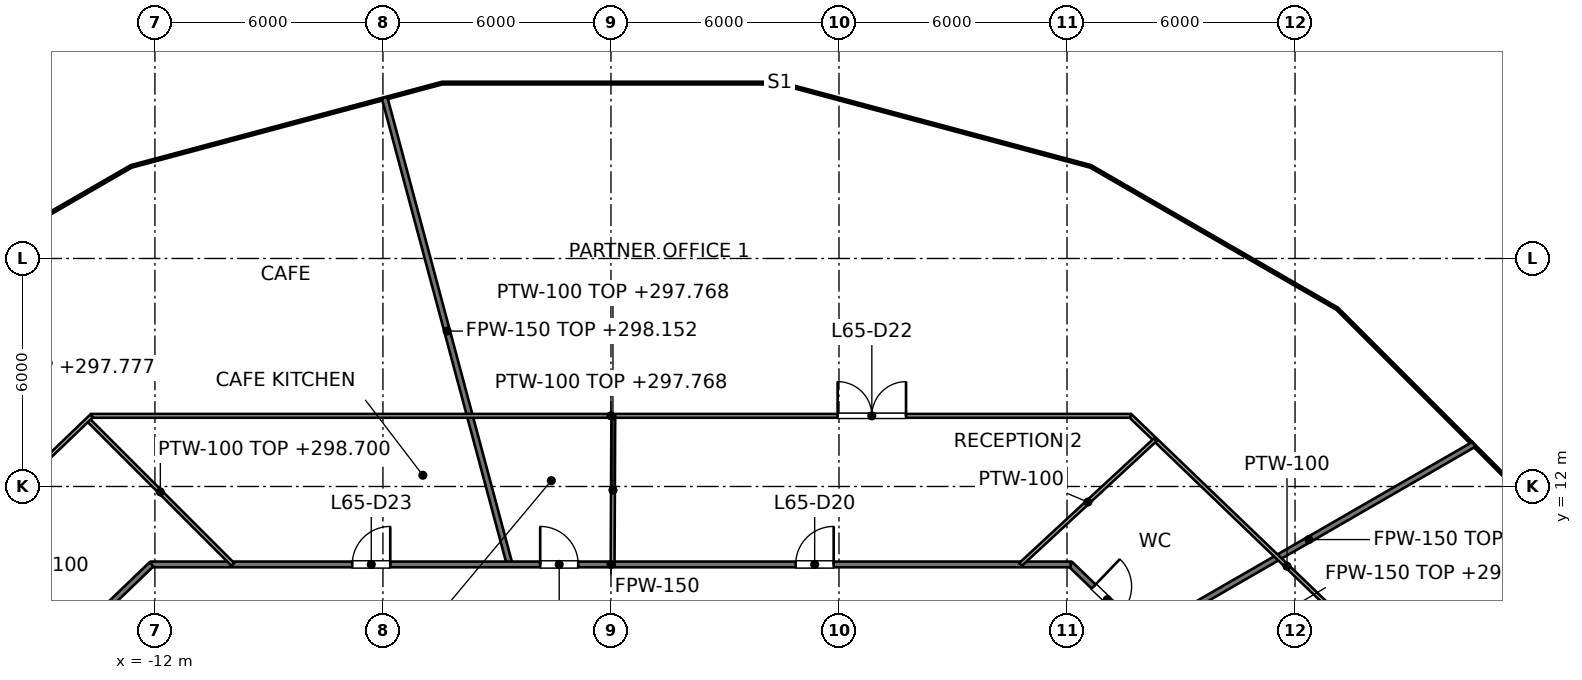
"""IFC4 building model, lengths in metres.
Left out: names, types, materials, properties, quantities, classifications, styles, units other than length and angle.
Written with IfcOpenShell. Run it as: python <this file> out.ifc"""

import sys

from ifc_helpers import new_model, si_unit, direction, frame, frame_2d, origin, place, context, subcontext, project, spatial, rectangle, extrude, element, fill, save


model = new_model("IFC4")
c1 = context("Model", 3, precision=1e-05, world=origin(), true_north=direction((0.0, 1.0)))
c2 = subcontext(c1, "Body", "Model", "MODEL_VIEW")
j1 = project(units=[si_unit("LENGTHUNIT", "METRE"), si_unit("PLANEANGLEUNIT", "RADIAN")], contexts=[c1])
p1 = place(None, origin())
s1 = spatial("IfcSite", under=j1, at=p1, CompositionType="ELEMENT")
p2 = place(p1, origin())
s2 = spatial("IfcBuilding", under=s1, at=p2, CompositionType="ELEMENT")
p3 = place(p2, frame((0.0, 0.0, 295.0)))
s3 = spatial("IfcBuildingStorey", under=s2, at=p3, CompositionType="ELEMENT", Elevation=295.0)
p4 = place(p3, frame((-5.957, 22.23, 0.0), z_axis=(0.0, 0.0, 1.0), x_axis=(0.258861178381, -0.965914535726, 0.0)))
e1 = element("IfcWall", 1, at=p4, inside=s3, PredefinedType="PARTITIONING", context=c2, shape_type="SweptSolid", body=[
    extrude(rectangle(XDim=12.714, YDim=0.15, at=frame_2d((6.357, 0.0))), origin(), (0.0, 0.0, 1.0), 3.152),
])
p5 = place(p3, frame((12.095, 9.949, 0.0), z_axis=(0.0, 0.0, 1.0), x_axis=(0.721290181137, -0.692633001376, 0.0)))
e2 = element("IfcWall", 2, at=p5, inside=s3, PredefinedType="PARTITIONING", context=c2, shape_type="SweptSolid", body=[
    extrude(rectangle(XDim=8.187, YDim=0.15, at=frame_2d((4.094, 0.0))), origin(), (0.0, 0.0, 1.0), 2.777),
])
p6 = place(p5, frame((0.839, 0.0, 0.0)))
e3 = element("IfcOpeningElement", 3, at=p6, cuts=e2, PredefinedType="OPENING", context=c2, shape_type="SweptSolid", body=[
    extrude(rectangle(XDim=1.0, YDim=2.1, at=frame_2d((0.5, 1.05))), frame((0.0, 0.075, 0.0), z_axis=(0.0, -1.0, 0.0), x_axis=(1.0, 0.0, 0.0)), (0.0, 0.0, 1.0), 0.15),
])
p7 = place(p3, frame((-12.095, 9.949, 0.0), z_axis=(0.0, 0.0, 1.0), x_axis=(1.0, 0.0, 0.0)))
e4 = element("IfcWall", 4, at=p7, inside=s3, PredefinedType="PARTITIONING", context=c2, shape_type="SweptSolid", body=[
    extrude(rectangle(XDim=24.19, YDim=0.15, at=frame_2d((12.095, 0.0))), origin(), (0.0, 0.0, 1.0), 2.768),
])
p8 = place(p7, frame((16.955, 0.0, 0.0)))
e5 = element("IfcOpeningElement", 5, at=p8, cuts=e4, PredefinedType="OPENING", context=c2, shape_type="SweptSolid", body=[
    extrude(rectangle(XDim=1.0, YDim=2.1, at=frame_2d((0.5, 1.05))), frame((0.0, 0.075, 0.0), z_axis=(0.0, -1.0, 0.0), x_axis=(1.0, 0.0, 0.0)), (0.0, 0.0, 1.0), 0.15),
])
p9 = place(p7, frame((10.233, 0.0, 0.0)))
e6 = element("IfcOpeningElement", 6, at=p9, cuts=e4, PredefinedType="OPENING", context=c2, shape_type="SweptSolid", body=[
    extrude(rectangle(XDim=1.0, YDim=2.1, at=frame_2d((0.5, 1.05))), frame((0.0, 0.075, 0.0), z_axis=(0.0, -1.0, 0.0), x_axis=(1.0, 0.0, 0.0)), (0.0, 0.0, 1.0), 0.15),
])
p10 = place(p7, frame((5.288, 0.0, 0.0)))
e7 = element("IfcOpeningElement", 7, at=p10, cuts=e4, PredefinedType="OPENING", context=c2, shape_type="SweptSolid", body=[
    extrude(rectangle(XDim=1.0, YDim=2.1, at=frame_2d((0.5, 1.05))), frame((0.0, 0.075, 0.0), z_axis=(0.0, -1.0, 0.0), x_axis=(1.0, 0.0, 0.0)), (0.0, 0.0, 1.0), 0.15),
])
p11 = place(p3, frame((14.024, 8.097, 0.0), z_axis=(0.0, 0.0, 1.0), x_axis=(0.866012014455, 0.500023190282, 0.0)))
e8 = element("IfcWall", 8, at=p11, inside=s3, PredefinedType="PARTITIONING", context=c2, shape_type="SweptSolid", body=[
    extrude(rectangle(XDim=10.025, YDim=0.15, at=frame_2d((5.013, 0.0))), origin(), (0.0, 0.0, 1.0), 3.274),
])
p12 = place(p3, frame((-18.0, 4.278, 0.0), z_axis=(0.0, 0.0, 1.0), x_axis=(0.721363483883, 0.692556657697, 0.0)))
e9 = element("IfcWall", 9, at=p12, inside=s3, PredefinedType="PARTITIONING", context=c2, shape_type="SweptSolid", body=[
    extrude(rectangle(XDim=8.187, YDim=0.15, at=frame_2d((4.094, 0.0))), origin(), (0.0, 0.0, 1.0), 2.777),
])
p13 = place(p12, frame((3.646, 0.0, 0.0)))
e10 = element("IfcOpeningElement", 10, at=p13, cuts=e9, PredefinedType="OPENING", context=c2, shape_type="SweptSolid", body=[
    extrude(rectangle(XDim=1.0, YDim=2.1, at=frame_2d((0.5, 1.05))), frame((0.0, 0.075, 0.0), z_axis=(0.0, -1.0, 0.0), x_axis=(1.0, 0.0, 0.0)), (0.0, 0.0, 1.0), 0.15),
])
p14 = place(p3, frame((-13.766, 13.765, 0.0), z_axis=(0.0, 0.0, 1.0), x_axis=(0.707219854948, -0.70699368934, 0.0)))
e11 = element("IfcWall", 11, at=p14, inside=s3, PredefinedType="PARTITIONING", context=c2, shape_type="SweptSolid", body=[
    extrude(rectangle(XDim=5.397, YDim=0.1, at=frame_2d((2.699, 0.0))), origin(), (0.0, 0.0, 1.0), 3.7),
])
p15 = place(p3, frame((13.668, 13.859, 0.0), z_axis=(0.0, 0.0, 1.0), x_axis=(0.721286980933, -0.692636333971, 0.0)))
e12 = element("IfcWall", 12, at=p15, inside=s3, PredefinedType="PARTITIONING", context=c2, shape_type="SweptSolid", body=[
    extrude(rectangle(XDim=11.427, YDim=0.1, at=frame_2d((5.713, 0.0))), origin(), (0.0, 0.0, 1.0), 2.777),
])
p16 = place(p3, frame((-13.668, 13.859, 0.0), z_axis=(0.0, 0.0, 1.0), x_axis=(1.0, 0.0, 0.0)))
e13 = element("IfcWall", 13, at=p16, inside=s3, PredefinedType="PARTITIONING", context=c2, shape_type="SweptSolid", body=[
    extrude(rectangle(XDim=27.336, YDim=0.1, at=frame_2d((13.668, 0.0))), origin(), (0.0, 0.0, 1.0), 2.768),
])
p17 = place(p16, frame((19.633, 0.0, 0.0)))
e14 = element("IfcOpeningElement", 14, at=p17, cuts=e13, PredefinedType="OPENING", context=c2, shape_type="SweptSolid", body=[
    extrude(rectangle(XDim=1.8, YDim=2.1, at=frame_2d((0.9, 1.05))), frame((0.0, 0.05, 0.0), z_axis=(0.0, -1.0, 0.0), x_axis=(1.0, 0.0, 0.0)), (0.0, 0.0, 1.0), 0.1),
])
p18 = place(p3, frame((10.777, 9.949, 0.0), z_axis=(0.0, 0.0, 1.0), x_axis=(0.733892218001, 0.679265936403, 0.0)))
e15 = element("IfcWall", 15, at=p18, inside=s3, PredefinedType="PARTITIONING", context=c2, shape_type="SweptSolid", body=[
    extrude(rectangle(XDim=4.831, YDim=0.1, at=frame_2d((2.416, 0.0))), origin(), (0.0, 0.0, 1.0), 2.777),
])
p19 = place(p3, frame((-21.91, 5.944, 0.0), z_axis=(0.0, 0.0, 1.0), x_axis=(0.721423184004, 0.69249446899, 0.0)))
e16 = element("IfcWall", 16, at=p19, inside=s3, PredefinedType="PARTITIONING", context=c2, shape_type="SweptSolid", body=[
    extrude(rectangle(XDim=11.427, YDim=0.1, at=frame_2d((5.713, 0.0))), origin(), (0.0, 0.0, 1.0), 2.777),
])
p20 = place(p19, frame((4.75, 0.0, 0.0)))
e17 = element("IfcOpeningElement", 17, at=p20, cuts=e16, PredefinedType="OPENING", context=c2, shape_type="SweptSolid", body=[
    extrude(rectangle(XDim=1.8, YDim=2.1, at=frame_2d((0.9, 1.05))), frame((0.0, 0.05, 0.0), z_axis=(0.0, -1.0, 0.0), x_axis=(1.0, 0.0, 0.0)), (0.0, 0.0, 1.0), 0.1),
])
p21 = place(p3, frame((0.044, 9.949, 0.0), z_axis=(0.0, 0.0, 1.0), x_axis=(0.004370860527, 0.999990447744, 0.0)))
e18 = element("IfcWall", 18, at=p21, inside=s3, PredefinedType="PARTITIONING", context=c2, shape_type="SweptSolid", body=[
    extrude(rectangle(XDim=3.91, YDim=0.1, at=frame_2d((1.955, 0.0))), origin(), (0.0, 0.0, 1.0), 2.768),
])
p22 = place(p6, origin())
e19 = element("IfcDoor", 19, at=p22, inside=s3, OperationType="SINGLE_SWING_LEFT", PredefinedType="DOOR", context=c2, shape_type="SweptSolid", body=[
    extrude(rectangle(XDim=1.0, YDim=2.1, at=frame_2d((0.5, 1.05))), frame((0.0, 0.025, 0.0), z_axis=(0.0, -1.0, 0.0), x_axis=(1.0, 0.0, 0.0)), (0.0, 0.0, 1.0), 0.05),
])
fill(e3, e19)
p23 = place(p8, origin())
e20 = element("IfcDoor", 20, at=p23, inside=s3, OperationType="SINGLE_SWING_RIGHT", PredefinedType="DOOR", context=c2, shape_type="SweptSolid", body=[
    extrude(rectangle(XDim=1.0, YDim=2.1, at=frame_2d((0.5, 1.05))), frame((0.0, 0.025, 0.0), z_axis=(0.0, -1.0, 0.0), x_axis=(1.0, 0.0, 0.0)), (0.0, 0.0, 1.0), 0.05),
])
fill(e5, e20)
p24 = place(p9, origin())
e21 = element("IfcDoor", 21, at=p24, inside=s3, OperationType="SINGLE_SWING_LEFT", PredefinedType="DOOR", context=c2, shape_type="SweptSolid", body=[
    extrude(rectangle(XDim=1.0, YDim=2.1, at=frame_2d((0.5, 1.05))), frame((0.0, 0.025, 0.0), z_axis=(0.0, -1.0, 0.0), x_axis=(1.0, 0.0, 0.0)), (0.0, 0.0, 1.0), 0.05),
])
fill(e6, e21)
p25 = place(p17, origin())
e22 = element("IfcDoor", 22, at=p25, inside=s3, OperationType="DOUBLE_DOOR_SINGLE_SWING", PredefinedType="DOOR", context=c2, shape_type="SweptSolid", body=[
    extrude(rectangle(XDim=1.8, YDim=2.1, at=frame_2d((0.9, 1.05))), frame((0.0, 0.025, 0.0), z_axis=(0.0, -1.0, 0.0), x_axis=(1.0, 0.0, 0.0)), (0.0, 0.0, 1.0), 0.05),
])
fill(e14, e22)
p26 = place(p10, origin())
e23 = element("IfcDoor", 23, at=p26, inside=s3, OperationType="SINGLE_SWING_RIGHT", PredefinedType="DOOR", context=c2, shape_type="SweptSolid", body=[
    extrude(rectangle(XDim=1.0, YDim=2.1, at=frame_2d((0.5, 1.05))), frame((0.0, 0.025, 0.0), z_axis=(0.0, -1.0, 0.0), x_axis=(1.0, 0.0, 0.0)), (0.0, 0.0, 1.0), 0.05),
])
fill(e7, e23)
save(model, sys.argv[1])
